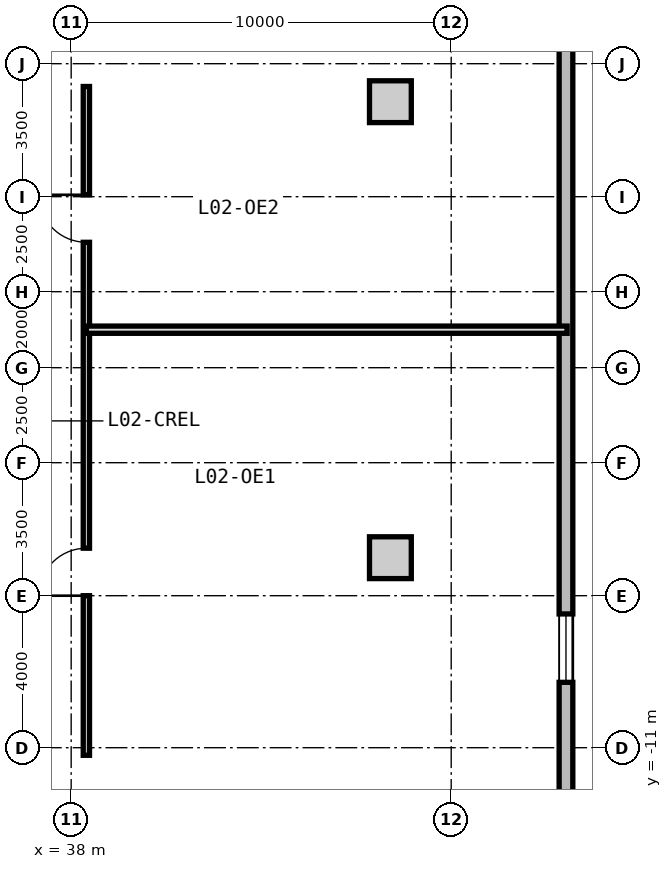
"""IFC4 building model, lengths in metres.
Left out: names, types, materials, properties, quantities, classifications, styles, units other than length and angle.
Written with IfcOpenShell. Run it as: python <this file> out.ifc"""

import sys

from ifc_helpers import new_model, si_unit, direction, frame, frame_2d, origin, origin_2d, place, context, subcontext, project, spatial, rectangle, extrude, source, transform, mapped, element, fill, save


model = new_model("IFC4")
c1 = context("Model", 3, precision=1e-05, world=origin(), true_north=direction((0.0, 1.0)))
c2 = subcontext(c1, "Body", "Model", "MODEL_VIEW")
j1 = project(units=[si_unit("LENGTHUNIT", "METRE"), si_unit("PLANEANGLEUNIT", "RADIAN")], contexts=[c1])
p1 = place(None, origin())
s1 = spatial("IfcSite", under=j1, at=p1, CompositionType="ELEMENT")
p2 = place(p1, origin())
s2 = spatial("IfcBuilding", under=s1, at=p2, CompositionType="ELEMENT")
p3 = place(p2, frame((0.0, 0.0, 8.4)))
s3 = spatial("IfcBuildingStorey", under=s2, at=p3, CompositionType="ELEMENT", Elevation=8.4)
m1 = source(origin(), c2, "Body", "SweptSolid", [
    extrude(rectangle(XDim=1.1, YDim=1.1, at=origin_2d()), origin(), (0.0, 0.0, 1.0), 4.2),
])
for number, where, z_axis, x_axis in (
    (1, (46.4, -6.0, 0.0), (0.0, 0.0, 1.0), (1.0, 0.0, 0.0)),
    (2, (46.4, 6.0, 0.0), (0.0, 0.0, 1.0), (1.0, 0.0, 0.0)),
):
    element("IfcColumn", number, at=place(p3, frame(where, z_axis=z_axis, x_axis=x_axis)), inside=s3, PredefinedType="COLUMN", context=c2, shape_type="MappedRepresentation", body=[
        mapped(m1, transform((0.0, 0.0, 0.0), x_axis=(1.0, 0.0, 0.0), y_axis=(0.0, 1.0, 0.0), z_axis=(0.0, 0.0, 1.0), scale=1.0)),
    ])
m2 = source(origin(), c2, "Body", "SweptSolid", [
    extrude(rectangle(XDim=43.44, YDim=0.36, at=frame_2d((21.72, 0.0))), origin(), (0.0, 0.0, 1.0), 3.88),
])
p4 = place(p3, frame((51.02, 21.72, 0.0), z_axis=(0.0, 0.0, 1.0), x_axis=(0.0, -1.0, 0.0)))
e3 = element("IfcWall", 3, at=p4, inside=s3, PredefinedType="SOLIDWALL", context=c2, shape_type="MappedRepresentation", body=[
    mapped(m2, transform((0.0, 0.0, 0.0), x_axis=(1.0, 0.0, 0.0), y_axis=(0.0, 1.0, 0.0), z_axis=(0.0, 0.0, 1.0), scale=1.0)),
])
p5 = place(p4, frame((4.0, 0.0, 0.9)))
e4 = element("IfcOpeningElement", 4, at=p5, cuts=e3, PredefinedType="OPENING", context=c2, shape_type="SweptSolid", body=[
    extrude(rectangle(XDim=1.8, YDim=2.0, at=frame_2d((0.9, 1.0))), frame((0.0, 0.19, 0.0), z_axis=(0.0, -1.0, 0.0), x_axis=(1.0, 0.0, 0.0)), (0.0, 0.0, 1.0), 0.38),
])
p6 = place(p4, frame((29.2, 0.0, 0.9)))
e5 = element("IfcOpeningElement", 5, at=p6, cuts=e3, PredefinedType="OPENING", context=c2, shape_type="SweptSolid", body=[
    extrude(rectangle(XDim=1.8, YDim=2.0, at=frame_2d((0.9, 1.0))), frame((0.0, 0.19, 0.0), z_axis=(0.0, -1.0, 0.0), x_axis=(1.0, 0.0, 0.0)), (0.0, 0.0, 1.0), 0.38),
])
m3 = source(origin(), c2, "Body", "SweptSolid", [
    extrude(rectangle(XDim=17.6, YDim=0.165, at=frame_2d((8.8, 0.0))), origin(), (0.0, 0.0, 1.0), 3.865),
])
p7 = place(p3, frame((38.4, -11.2, 0.0), z_axis=(0.0, 0.0, 1.0), x_axis=(0.0, 1.0, 0.0)))
e6 = element("IfcWall", 6, at=p7, inside=s3, PredefinedType="PARTITIONING", context=c2, shape_type="MappedRepresentation", body=[
    mapped(m3, transform((0.0, 0.0, 0.0), x_axis=(1.0, 0.0, 0.0), y_axis=(0.0, 1.0, 0.0), z_axis=(0.0, 0.0, 1.0), scale=1.0)),
])
p8 = place(p7, frame((4.2, 0.0, 0.0)))
e7 = element("IfcOpeningElement", 7, at=p8, cuts=e6, PredefinedType="OPENING", context=c2, shape_type="SweptSolid", body=[
    extrude(rectangle(XDim=1.25, YDim=2.2, at=frame_2d((0.625, 1.1))), frame((0.0, 0.093, 0.0), z_axis=(0.0, -1.0, 0.0), x_axis=(1.0, 0.0, 0.0)), (0.0, 0.0, 1.0), 0.185),
])
p9 = place(p7, frame((13.5, 0.0, 0.0)))
e8 = element("IfcOpeningElement", 8, at=p9, cuts=e6, PredefinedType="OPENING", context=c2, shape_type="SweptSolid", body=[
    extrude(rectangle(XDim=1.25, YDim=2.2, at=frame_2d((0.625, 1.1))), frame((0.0, 0.093, 0.0), z_axis=(0.0, -1.0, 0.0), x_axis=(1.0, 0.0, 0.0)), (0.0, 0.0, 1.0), 0.185),
])
m4 = source(origin(), c2, "Body", "SweptSolid", [
    extrude(rectangle(XDim=12.65, YDim=0.19, at=frame_2d((6.325, 0.0))), origin(), (0.0, 0.0, 1.0), 3.865),
])
p10 = place(p3, frame((38.4, 0.0, 0.0), z_axis=(0.0, 0.0, 1.0), x_axis=(1.0, 0.0, 0.0)))
e9 = element("IfcWall", 9, at=p10, inside=s3, PredefinedType="PARTITIONING", context=c2, shape_type="MappedRepresentation", body=[
    mapped(m4, transform((0.0, 0.0, 0.0), x_axis=(1.0, 0.0, 0.0), y_axis=(0.0, 1.0, 0.0), z_axis=(0.0, 0.0, 1.0), scale=1.0)),
])
m5 = source(origin(), c2, "Body", "SweptSolid", [
    extrude(rectangle(XDim=1.8, YDim=2.0, at=frame_2d((0.9, 1.0))), frame((0.0, 0.03, 0.0), z_axis=(0.0, -1.0, 0.0), x_axis=(1.0, 0.0, 0.0)), (0.0, 0.0, 1.0), 0.06),
])
p11 = place(p6, origin())
e10 = element("IfcWindow", 10, at=p11, inside=s3, PartitioningType="SINGLE_PANEL", PredefinedType="WINDOW", context=c2, shape_type="MappedRepresentation", body=[
    mapped(m5, transform((0.0, 0.0, 0.0), x_axis=(1.0, 0.0, 0.0), y_axis=(0.0, 1.0, 0.0), z_axis=(0.0, 0.0, 1.0), scale=1.0)),
])
fill(e5, e10)
m6 = source(origin(), c2, "Body", "SweptSolid", [
    extrude(rectangle(XDim=1.25, YDim=2.2, at=frame_2d((0.625, 1.1))), frame((0.0, 0.025, 0.0), z_axis=(0.0, -1.0, 0.0), x_axis=(1.0, 0.0, 0.0)), (0.0, 0.0, 1.0), 0.05),
])
p12 = place(p8, origin())
e11 = element("IfcDoor", 11, at=p12, inside=s3, OperationType="SINGLE_SWING_LEFT", PredefinedType="DOOR", context=c2, shape_type="MappedRepresentation", body=[
    mapped(m6, transform((0.0, 0.0, 0.0), x_axis=(1.0, 0.0, 0.0), y_axis=(0.0, 1.0, 0.0), z_axis=(0.0, 0.0, 1.0), scale=1.0)),
])
fill(e7, e11)
p13 = place(p9, origin())
e12 = element("IfcDoor", 12, at=p13, inside=s3, OperationType="SINGLE_SWING_RIGHT", PredefinedType="DOOR", context=c2, shape_type="MappedRepresentation", body=[
    mapped(m6, transform((0.0, 0.0, 0.0), x_axis=(1.0, 0.0, 0.0), y_axis=(0.0, 1.0, 0.0), z_axis=(0.0, 0.0, 1.0), scale=1.0)),
])
fill(e8, e12)
save(model, sys.argv[1])
